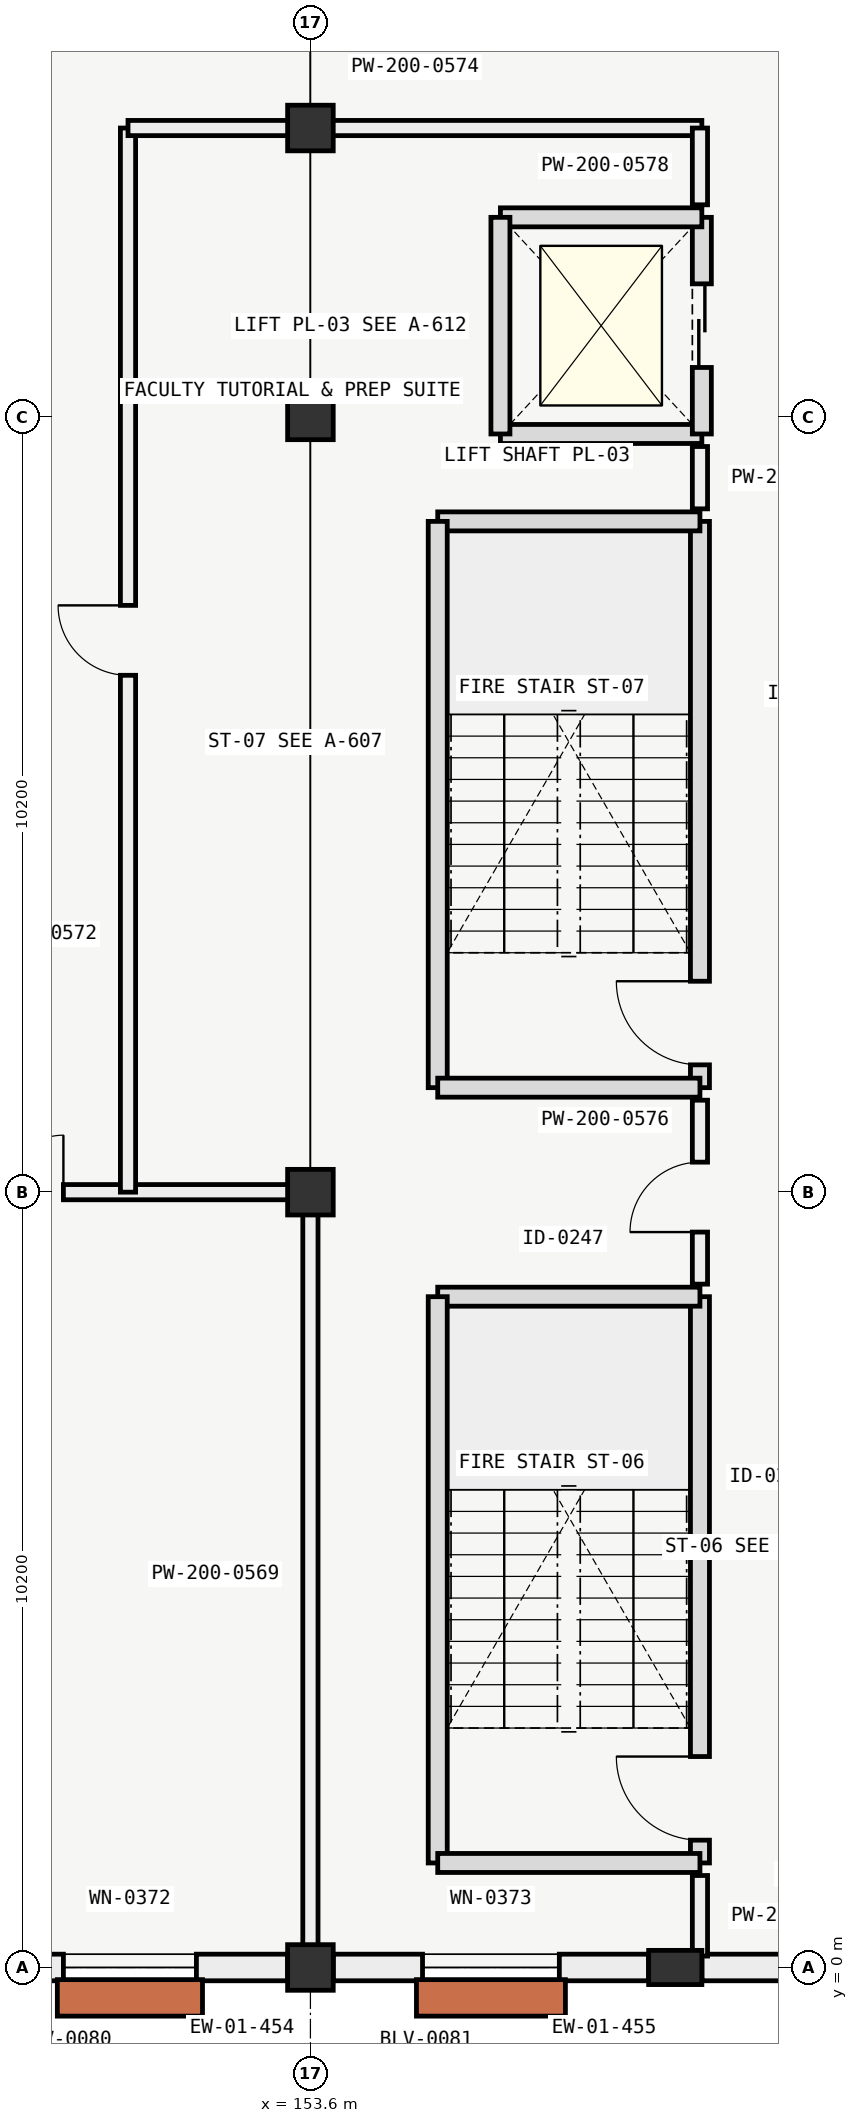
"""IFC4 building model, lengths in metres.
Left out: names, types, materials, properties, quantities, classifications, styles, units other than length and angle.
Written with IfcOpenShell. Run it as: python <this file> out.ifc"""

import sys

from ifc_helpers import new_model, si_unit, direction, frame, frame_2d, origin, origin_2d, place, context, subcontext, project, spatial, rectangle, extrude, element, fill, save


model = new_model("IFC4")
c1 = context("Model", 3, precision=1e-05, world=origin(), true_north=direction((0.0, 1.0)))
c2 = subcontext(c1, "Body", "Model", "MODEL_VIEW")
j1 = project(units=[si_unit("LENGTHUNIT", "METRE"), si_unit("PLANEANGLEUNIT", "RADIAN")], contexts=[c1])
p1 = place(None, origin())
s1 = spatial("IfcSite", under=j1, at=p1, CompositionType="ELEMENT")
p2 = place(p1, origin())
s2 = spatial("IfcBuilding", under=s1, at=p2, CompositionType="ELEMENT")
p3 = place(p2, frame((0.0, 0.0, 9.6)))
s3 = spatial("IfcBuildingStorey", under=s2, at=p3, CompositionType="ELEMENT", Elevation=9.6)
for number, where, z_axis, x_axis in (
    (1, (153.6, 0.0, 0.0), (0.0, 0.0, 1.0), (1.0, 0.0, 0.0)),
    (2, (153.6, 10.2, 0.0), (0.0, 0.0, 1.0), (1.0, 0.0, 0.0)),
    (3, (153.6, 20.4, 0.0), (0.0, 0.0, 1.0), (1.0, 0.0, 0.0)),
    (4, (153.6, 24.2, 0.0), (0.0, 0.0, 1.0), (1.0, 0.0, 0.0)),
):
    element("IfcColumn", number, at=place(p3, frame(where, z_axis=z_axis, x_axis=x_axis)), inside=s3, PredefinedType="COLUMN", context=c2, shape_type="SweptSolid", body=[
        extrude(rectangle(XDim=0.6, YDim=0.6, at=origin_2d()), origin(), (0.0, 0.0, 1.0), 4.2),
    ])
p4 = place(p3, frame((158.4, 0.0, 0.0), z_axis=(0.0, 0.0, 1.0), x_axis=(0.0, 1.0, 0.0)))
e5 = element("IfcColumn", 5, at=p4, inside=s3, PredefinedType="PILASTER", context=c2, shape_type="SweptSolid", body=[
    extrude(rectangle(XDim=0.45, YDim=0.7, at=origin_2d()), origin(), (0.0, 0.0, 1.0), 4.2),
])
p5 = place(p3, frame((153.299, 0.0, 0.0), z_axis=(0.0, 0.0, 1.0), x_axis=(-1.0, 0.0, 0.0)))
e6 = element("IfcWall", 6, at=p5, inside=s3, PredefinedType="SOLIDWALL", context=c2, shape_type="SweptSolid", body=[
    extrude(rectangle(XDim=4.148, YDim=0.35, at=frame_2d((2.074, 0.0))), origin(), (0.0, 0.0, 1.0), 3.25),
])
p6 = place(p5, frame((1.199, 0.0, 0.85)))
e7 = element("IfcOpeningElement", 7, at=p6, cuts=e6, PredefinedType="OPENING", context=c2, shape_type="SweptSolid", body=[
    extrude(rectangle(XDim=1.75, YDim=2.05, at=frame_2d((0.875, 1.025))), frame((0.0, 0.185, 0.0), z_axis=(0.0, -1.0, 0.0), x_axis=(1.0, 0.0, 0.0)), (0.0, 0.0, 1.0), 0.37),
])
p7 = place(p3, frame((158.049, 0.0, 0.0), z_axis=(0.0, 0.0, 1.0), x_axis=(-1.0, 0.0, 0.0)))
e8 = element("IfcWall", 8, at=p7, inside=s3, PredefinedType="SOLIDWALL", context=c2, shape_type="SweptSolid", body=[
    extrude(rectangle(XDim=4.148, YDim=0.35, at=frame_2d((2.074, 0.0))), origin(), (0.0, 0.0, 1.0), 3.25),
])
p8 = place(p7, frame((1.174, 0.0, 0.85)))
e9 = element("IfcOpeningElement", 9, at=p8, cuts=e8, PredefinedType="OPENING", context=c2, shape_type="SweptSolid", body=[
    extrude(rectangle(XDim=1.8, YDim=2.1, at=frame_2d((0.9, 1.05))), frame((0.0, 0.185, 0.0), z_axis=(0.0, -1.0, 0.0), x_axis=(1.0, 0.0, 0.0)), (0.0, 0.0, 1.0), 0.37),
])
p9 = place(p3, frame((161.95, 0.0, 0.0), z_axis=(0.0, 0.0, 1.0), x_axis=(-1.0, 0.0, 0.0)))
e10 = element("IfcWall", 10, at=p9, inside=s3, PredefinedType="SOLIDWALL", context=c2, shape_type="SweptSolid", body=[
    extrude(rectangle(XDim=3.199, YDim=0.35, at=frame_2d((1.6, 0.0))), origin(), (0.0, 0.0, 1.0), 3.25),
])
p10 = place(p9, frame((1.05, 0.0, 0.75)))
e11 = element("IfcOpeningElement", 11, at=p10, cuts=e10, PredefinedType="OPENING", context=c2, shape_type="SweptSolid", body=[
    extrude(rectangle(XDim=1.1, YDim=2.3, at=frame_2d((0.55, 1.15))), frame((0.0, 0.185, 0.0), z_axis=(0.0, -1.0, 0.0), x_axis=(1.0, 0.0, 0.0)), (0.0, 0.0, 1.0), 0.37),
])
p11 = place(p3, frame((158.725, 1.375, 0.0), z_axis=(0.0, 0.0, 1.0), x_axis=(0.0, 1.0, 0.0)))
e12 = element("IfcWall", 12, at=p11, inside=s3, PredefinedType="SOLIDWALL", context=c2, shape_type="SweptSolid", body=[
    extrude(rectangle(XDim=7.45, YDim=0.25, at=frame_2d((3.725, 0.0))), origin(), (0.0, 0.0, 1.0), 3.95),
])
p12 = place(p11, frame((0.3, 0.0, 0.0)))
e13 = element("IfcOpeningElement", 13, at=p12, cuts=e12, PredefinedType="OPENING", context=c2, shape_type="SweptSolid", body=[
    extrude(rectangle(XDim=1.1, YDim=2.2, at=frame_2d((0.55, 1.1))), frame((0.0, 0.135, 0.0), z_axis=(0.0, -1.0, 0.0), x_axis=(1.0, 0.0, 0.0)), (0.0, 0.0, 1.0), 0.27),
])
p13 = place(p3, frame((158.725, 8.825, 0.0), z_axis=(0.0, 0.0, 1.0), x_axis=(-1.0, 0.0, 0.0)))
e14 = element("IfcWall", 14, at=p13, inside=s3, PredefinedType="SOLIDWALL", context=c2, shape_type="SweptSolid", body=[
    extrude(rectangle(XDim=3.45, YDim=0.25, at=frame_2d((1.725, 0.0))), origin(), (0.0, 0.0, 1.0), 3.95),
])
p14 = place(p3, frame((155.275, 8.825, 0.0), z_axis=(0.0, 0.0, 1.0), x_axis=(0.0, -1.0, 0.0)))
e15 = element("IfcWall", 15, at=p14, inside=s3, PredefinedType="SOLIDWALL", context=c2, shape_type="SweptSolid", body=[
    extrude(rectangle(XDim=7.45, YDim=0.25, at=frame_2d((3.725, 0.0))), origin(), (0.0, 0.0, 1.0), 3.95),
])
p15 = place(p3, frame((155.275, 1.375, 0.0), z_axis=(0.0, 0.0, 1.0), x_axis=(1.0, 0.0, 0.0)))
e16 = element("IfcWall", 16, at=p15, inside=s3, PredefinedType="SOLIDWALL", context=c2, shape_type="SweptSolid", body=[
    extrude(rectangle(XDim=3.45, YDim=0.25, at=frame_2d((1.725, 0.0))), origin(), (0.0, 0.0, 1.0), 3.95),
])
p16 = place(p3, frame((158.725, 11.575, 0.0), z_axis=(0.0, 0.0, 1.0), x_axis=(0.0, 1.0, 0.0)))
e17 = element("IfcWall", 17, at=p16, inside=s3, PredefinedType="SOLIDWALL", context=c2, shape_type="SweptSolid", body=[
    extrude(rectangle(XDim=7.45, YDim=0.25, at=frame_2d((3.725, 0.0))), origin(), (0.0, 0.0, 1.0), 3.95),
])
p17 = place(p16, frame((0.3, 0.0, 0.0)))
e18 = element("IfcOpeningElement", 18, at=p17, cuts=e17, PredefinedType="OPENING", context=c2, shape_type="SweptSolid", body=[
    extrude(rectangle(XDim=1.1, YDim=2.2, at=frame_2d((0.55, 1.1))), frame((0.0, 0.135, 0.0), z_axis=(0.0, -1.0, 0.0), x_axis=(1.0, 0.0, 0.0)), (0.0, 0.0, 1.0), 0.27),
])
p18 = place(p3, frame((158.725, 19.025, 0.0), z_axis=(0.0, 0.0, 1.0), x_axis=(-1.0, 0.0, 0.0)))
e19 = element("IfcWall", 19, at=p18, inside=s3, PredefinedType="SOLIDWALL", context=c2, shape_type="SweptSolid", body=[
    extrude(rectangle(XDim=3.45, YDim=0.25, at=frame_2d((1.725, 0.0))), origin(), (0.0, 0.0, 1.0), 3.95),
])
p19 = place(p3, frame((155.275, 19.025, 0.0), z_axis=(0.0, 0.0, 1.0), x_axis=(0.0, -1.0, 0.0)))
e20 = element("IfcWall", 20, at=p19, inside=s3, PredefinedType="SOLIDWALL", context=c2, shape_type="SweptSolid", body=[
    extrude(rectangle(XDim=7.45, YDim=0.25, at=frame_2d((3.725, 0.0))), origin(), (0.0, 0.0, 1.0), 3.95),
])
p20 = place(p3, frame((155.275, 11.575, 0.0), z_axis=(0.0, 0.0, 1.0), x_axis=(1.0, 0.0, 0.0)))
e21 = element("IfcWall", 21, at=p20, inside=s3, PredefinedType="SOLIDWALL", context=c2, shape_type="SweptSolid", body=[
    extrude(rectangle(XDim=3.45, YDim=0.25, at=frame_2d((1.725, 0.0))), origin(), (0.0, 0.0, 1.0), 3.95),
])
p21 = place(p3, frame((156.1, 20.175, 0.0), z_axis=(0.0, 0.0, 1.0), x_axis=(1.0, 0.0, 0.0)))
e22 = element("IfcWall", 22, at=p21, inside=s3, PredefinedType="SOLIDWALL", context=c2, shape_type="SweptSolid", body=[
    extrude(rectangle(XDim=2.65, YDim=0.25, at=frame_2d((1.325, 0.0))), origin(), (0.0, 0.0, 1.0), 3.95),
])
p22 = place(p3, frame((158.75, 20.175, 0.0), z_axis=(0.0, 0.0, 1.0), x_axis=(0.0, 1.0, 0.0)))
e23 = element("IfcWall", 23, at=p22, inside=s3, PredefinedType="SOLIDWALL", context=c2, shape_type="SweptSolid", body=[
    extrude(rectangle(XDim=2.85, YDim=0.25, at=frame_2d((1.425, 0.0))), origin(), (0.0, 0.0, 1.0), 3.95),
])
p23 = place(p22, frame((0.875, 0.0, 0.0)))
e24 = element("IfcOpeningElement", 24, at=p23, cuts=e23, PredefinedType="OPENING", context=c2, shape_type="SweptSolid", body=[
    extrude(rectangle(XDim=1.1, YDim=2.1, at=frame_2d((0.55, 1.05))), frame((0.0, 0.135, 0.0), z_axis=(0.0, -1.0, 0.0), x_axis=(1.0, 0.0, 0.0)), (0.0, 0.0, 1.0), 0.27),
])
p24 = place(p3, frame((158.75, 23.025, 0.0), z_axis=(0.0, 0.0, 1.0), x_axis=(-1.0, 0.0, 0.0)))
e25 = element("IfcWall", 25, at=p24, inside=s3, PredefinedType="SOLIDWALL", context=c2, shape_type="SweptSolid", body=[
    extrude(rectangle(XDim=2.65, YDim=0.25, at=frame_2d((1.325, 0.0))), origin(), (0.0, 0.0, 1.0), 3.95),
])
p25 = place(p3, frame((156.1, 23.025, 0.0), z_axis=(0.0, 0.0, 1.0), x_axis=(0.0, -1.0, 0.0)))
e26 = element("IfcWall", 26, at=p25, inside=s3, PredefinedType="SOLIDWALL", context=c2, shape_type="SweptSolid", body=[
    extrude(rectangle(XDim=2.85, YDim=0.25, at=frame_2d((1.425, 0.0))), origin(), (0.0, 0.0, 1.0), 3.95),
])
p26 = place(p3, frame((134.55, 10.2, 0.0), z_axis=(0.0, 0.0, 1.0), x_axis=(1.0, 0.0, 0.0)))
e27 = element("IfcWall", 27, at=p26, inside=s3, PredefinedType="PARTITIONING", context=c2, shape_type="SweptSolid", body=[
    extrude(rectangle(XDim=19.05, YDim=0.2, at=frame_2d((9.525, 0.0))), origin(), (0.0, 0.0, 1.0), 3.23),
])
p27 = place(p26, frame((14.3, 0.0, 0.0)))
e28 = element("IfcOpeningElement", 28, at=p27, cuts=e27, PredefinedType="OPENING", context=c2, shape_type="SweptSolid", body=[
    extrude(rectangle(XDim=1.5, YDim=2.2, at=frame_2d((0.75, 1.1))), frame((0.0, 0.11, 0.0), z_axis=(0.0, -1.0, 0.0), x_axis=(1.0, 0.0, 0.0)), (0.0, 0.0, 1.0), 0.22),
])
p28 = place(p3, frame((153.6, 0.15, 0.0), z_axis=(0.0, 0.0, 1.0), x_axis=(0.0, 1.0, 0.0)))
e29 = element("IfcWall", 29, at=p28, inside=s3, PredefinedType="PARTITIONING", context=c2, shape_type="SweptSolid", body=[
    extrude(rectangle(XDim=10.05, YDim=0.2, at=frame_2d((5.025, 0.0))), origin(), (0.0, 0.0, 1.0), 3.23),
])
p29 = place(p3, frame((151.2, 10.2, 0.0), z_axis=(0.0, 0.0, 1.0), x_axis=(0.0, 1.0, 0.0)))
e30 = element("IfcWall", 30, at=p29, inside=s3, PredefinedType="PARTITIONING", context=c2, shape_type="SweptSolid", body=[
    extrude(rectangle(XDim=14.0, YDim=0.2, at=frame_2d((7.0, 0.0))), origin(), (0.0, 0.0, 1.0), 3.23),
])
p30 = place(p29, frame((6.8, 0.0, 0.0)))
e31 = element("IfcOpeningElement", 31, at=p30, cuts=e30, PredefinedType="OPENING", context=c2, shape_type="SweptSolid", body=[
    extrude(rectangle(XDim=0.92, YDim=2.1, at=frame_2d((0.46, 1.05))), frame((0.0, 0.11, 0.0), z_axis=(0.0, -1.0, 0.0), x_axis=(1.0, 0.0, 0.0)), (0.0, 0.0, 1.0), 0.22),
])
p31 = place(p3, frame((151.2, 24.2, 0.0), z_axis=(0.0, 0.0, 1.0), x_axis=(1.0, 0.0, 0.0)))
e32 = element("IfcWall", 32, at=p31, inside=s3, PredefinedType="PARTITIONING", context=c2, shape_type="SweptSolid", body=[
    extrude(rectangle(XDim=7.55, YDim=0.2, at=frame_2d((3.775, 0.0))), origin(), (0.0, 0.0, 1.0), 2.33),
])
p32 = place(p3, frame((158.725, 0.15, 0.0), z_axis=(0.0, 0.0, 1.0), x_axis=(0.0, 1.0, 0.0)))
e33 = element("IfcWall", 33, at=p32, inside=s3, PredefinedType="PARTITIONING", context=c2, shape_type="SweptSolid", body=[
    extrude(rectangle(XDim=1.06, YDim=0.2, at=frame_2d((0.53, 0.0))), origin(), (0.0, 0.0, 1.0), 3.85),
])
p33 = place(p3, frame((158.725, 8.99, 0.0), z_axis=(0.0, 0.0, 1.0), x_axis=(0.0, 1.0, 0.0)))
e34 = element("IfcWall", 34, at=p33, inside=s3, PredefinedType="PARTITIONING", context=c2, shape_type="SweptSolid", body=[
    extrude(rectangle(XDim=2.42, YDim=0.2, at=frame_2d((1.21, 0.0))), origin(), (0.0, 0.0, 1.0), 3.23),
])
p34 = place(p33, frame((0.685, 0.0, 0.0)))
e35 = element("IfcOpeningElement", 35, at=p34, cuts=e34, PredefinedType="OPENING", context=c2, shape_type="SweptSolid", body=[
    extrude(rectangle(XDim=0.92, YDim=2.1, at=frame_2d((0.46, 1.05))), frame((0.0, 0.11, 0.0), z_axis=(0.0, -1.0, 0.0), x_axis=(1.0, 0.0, 0.0)), (0.0, 0.0, 1.0), 0.22),
])
p35 = place(p3, frame((158.725, 19.19, 0.0), z_axis=(0.0, 0.0, 1.0), x_axis=(0.0, 1.0, 0.0)))
e36 = element("IfcWall", 36, at=p35, inside=s3, PredefinedType="PARTITIONING", context=c2, shape_type="SweptSolid", body=[
    extrude(rectangle(XDim=0.82, YDim=0.2, at=frame_2d((0.41, 0.0))), origin(), (0.0, 0.0, 1.0), 3.85),
])
p36 = place(p3, frame((158.725, 23.19, 0.0), z_axis=(0.0, 0.0, 1.0), x_axis=(0.0, 1.0, 0.0)))
e37 = element("IfcWall", 37, at=p36, inside=s3, PredefinedType="PARTITIONING", context=c2, shape_type="SweptSolid", body=[
    extrude(rectangle(XDim=1.01, YDim=0.2, at=frame_2d((0.505, 0.0))), origin(), (0.0, 0.0, 1.0), 3.85),
])
p37 = place(p6, origin())
e38 = element("IfcWindow", 38, at=p37, inside=s3, PartitioningType="SINGLE_PANEL", PredefinedType="WINDOW", context=c2, shape_type="SweptSolid", body=[
    extrude(rectangle(XDim=1.75, YDim=2.05, at=frame_2d((0.875, 1.025))), frame((0.0, 0.03, 0.0), z_axis=(0.0, -1.0, 0.0), x_axis=(1.0, 0.0, 0.0)), (0.0, 0.0, 1.0), 0.06),
])
fill(e7, e38)
p38 = place(p8, origin())
e39 = element("IfcWindow", 39, at=p38, inside=s3, PartitioningType="SINGLE_PANEL", PredefinedType="WINDOW", context=c2, shape_type="SweptSolid", body=[
    extrude(rectangle(XDim=1.8, YDim=2.1, at=frame_2d((0.9, 1.05))), frame((0.0, 0.03, 0.0), z_axis=(0.0, -1.0, 0.0), x_axis=(1.0, 0.0, 0.0)), (0.0, 0.0, 1.0), 0.06),
])
fill(e9, e39)
p39 = place(p12, origin())
e40 = element("IfcDoor", 40, at=p39, inside=s3, OperationType="SINGLE_SWING_RIGHT", PredefinedType="DOOR", context=c2, shape_type="SweptSolid", body=[
    extrude(rectangle(XDim=1.1, YDim=2.2, at=frame_2d((0.55, 1.1))), frame((0.0, 0.025, 0.0), z_axis=(0.0, -1.0, 0.0), x_axis=(1.0, 0.0, 0.0)), (0.0, 0.0, 1.0), 0.05),
])
fill(e13, e40)
p40 = place(p17, origin())
e41 = element("IfcDoor", 41, at=p40, inside=s3, OperationType="SINGLE_SWING_RIGHT", PredefinedType="DOOR", context=c2, shape_type="SweptSolid", body=[
    extrude(rectangle(XDim=1.1, YDim=2.2, at=frame_2d((0.55, 1.1))), frame((0.0, 0.025, 0.0), z_axis=(0.0, -1.0, 0.0), x_axis=(1.0, 0.0, 0.0)), (0.0, 0.0, 1.0), 0.05),
])
fill(e18, e41)
p41 = place(p23, origin())
e42 = element("IfcDoor", 42, at=p41, inside=s3, OperationType="SLIDING_TO_LEFT", PredefinedType="DOOR", context=c2, shape_type="SweptSolid", body=[
    extrude(rectangle(XDim=1.1, YDim=2.1, at=frame_2d((0.55, 1.05))), frame((0.0, 0.025, 0.0), z_axis=(0.0, -1.0, 0.0), x_axis=(1.0, 0.0, 0.0)), (0.0, 0.0, 1.0), 0.05),
])
fill(e24, e42)
p42 = place(p27, origin())
e43 = element("IfcDoor", 43, at=p42, inside=s3, OperationType="DOUBLE_DOOR_SINGLE_SWING", PredefinedType="DOOR", context=c2, shape_type="SweptSolid", body=[
    extrude(rectangle(XDim=1.5, YDim=2.2, at=frame_2d((0.75, 1.1))), frame((0.0, 0.025, 0.0), z_axis=(0.0, -1.0, 0.0), x_axis=(1.0, 0.0, 0.0)), (0.0, 0.0, 1.0), 0.05),
])
fill(e28, e43)
p43 = place(p30, origin())
e44 = element("IfcDoor", 44, at=p43, inside=s3, OperationType="SINGLE_SWING_RIGHT", PredefinedType="DOOR", context=c2, shape_type="SweptSolid", body=[
    extrude(rectangle(XDim=0.92, YDim=2.1, at=frame_2d((0.46, 1.05))), frame((0.0, 0.025, 0.0), z_axis=(0.0, -1.0, 0.0), x_axis=(1.0, 0.0, 0.0)), (0.0, 0.0, 1.0), 0.05),
])
fill(e31, e44)
p44 = place(p34, origin())
e45 = element("IfcDoor", 45, at=p44, inside=s3, OperationType="SINGLE_SWING_LEFT", PredefinedType="DOOR", context=c2, shape_type="SweptSolid", body=[
    extrude(rectangle(XDim=0.92, YDim=2.1, at=frame_2d((0.46, 1.05))), frame((0.0, 0.025, 0.0), z_axis=(0.0, -1.0, 0.0), x_axis=(1.0, 0.0, 0.0)), (0.0, 0.0, 1.0), 0.05),
])
fill(e35, e45)
save(model, sys.argv[1])
